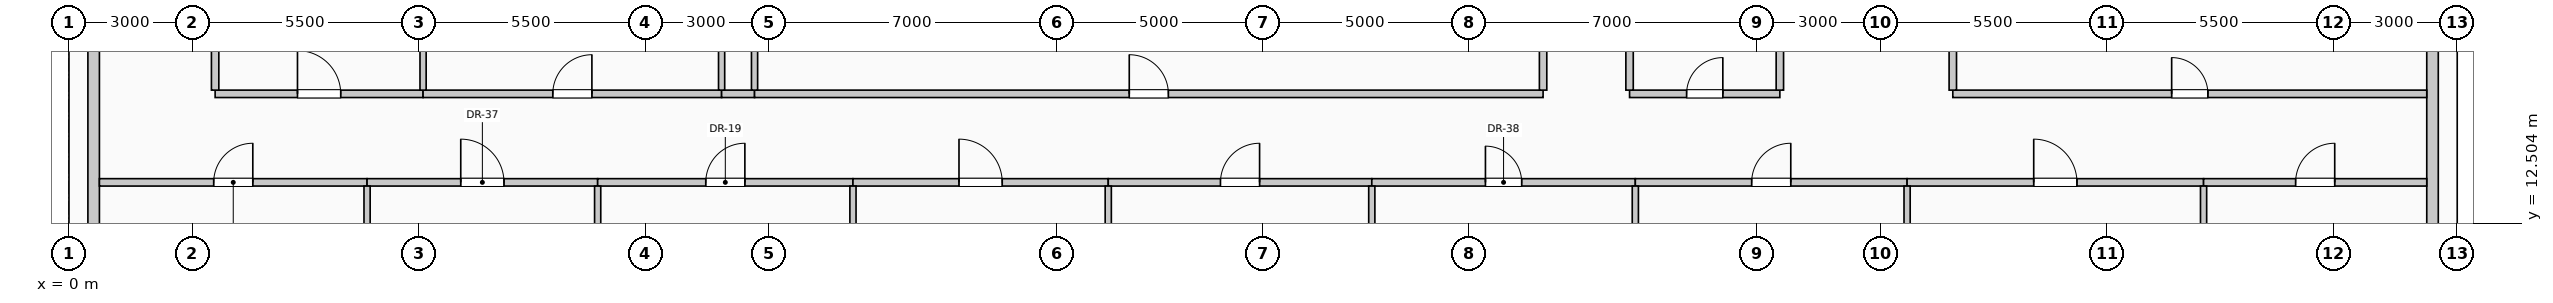
"""IFC4 building model, lengths in metres.
Left out: names, types, materials, properties, quantities, classifications, styles, units other than length and angle.
Written with IfcOpenShell. Run it as: python <this file> out.ifc"""

import sys

from ifc_helpers import new_model, si_unit, direction, frame, frame_2d, origin, place, context, subcontext, project, spatial, rectangle, extrude, element, fill, save


model = new_model("IFC4")
c1 = context("Model", 3, precision=1e-05, world=origin(), true_north=direction((0.0, 1.0)))
c2 = subcontext(c1, "Body", "Model", "MODEL_VIEW")
j1 = project(units=[si_unit("LENGTHUNIT", "METRE"), si_unit("PLANEANGLEUNIT", "RADIAN")], contexts=[c1])
p1 = place(None, origin())
s1 = spatial("IfcSite", under=j1, at=p1, CompositionType="ELEMENT")
p2 = place(p1, origin())
s2 = spatial("IfcBuilding", under=s1, at=p2, CompositionType="ELEMENT")
p3 = place(p2, frame((0.0, 0.0, 152.6)))
s3 = spatial("IfcBuildingStorey", under=s2, at=p3, CompositionType="ELEMENT", Elevation=152.6)
for number, where, z_axis, x_axis in (
    (1, (0.6, 10.445, 0.0), (0.0, 0.0, 1.0), (0.0, 1.0, 0.0)),
    (2, (57.4, 17.555, 0.0), (0.0, 0.0, 1.0), (0.0, -1.0, 0.0)),
):
    element("IfcWall", number, at=place(p3, frame(where, z_axis=z_axis, x_axis=x_axis)), inside=s3, PredefinedType="SOLIDWALL", context=c2, shape_type="SweptSolid", body=[
        extrude(rectangle(XDim=7.11, YDim=0.28, at=frame_2d((3.555, 0.0))), origin(), (0.0, 0.0, 1.0), 2.875),
    ])
p4 = place(p3, frame((0.74, 13.5, 0.0), z_axis=(0.0, 0.0, 1.0), x_axis=(1.0, 0.0, 0.0)))
e3 = element("IfcWall", 3, at=p4, inside=s3, PredefinedType="PARTITIONING", context=c2, shape_type="SweptSolid", body=[
    extrude(rectangle(XDim=6.5, YDim=0.18, at=frame_2d((3.25, 0.0))), origin(), (0.0, 0.0, 1.0), 3.725),
])
p5 = place(p4, frame((2.775, 0.0, 0.0)))
e4 = element("IfcOpeningElement", 4, at=p5, cuts=e3, PredefinedType="OPENING", context=c2, shape_type="SweptSolid", body=[
    extrude(rectangle(XDim=0.95, YDim=2.15, at=frame_2d((0.475, 1.075))), frame((0.0, 0.1, 0.0), z_axis=(0.0, -1.0, 0.0), x_axis=(1.0, 0.0, 0.0)), (0.0, 0.0, 1.0), 0.2),
])
p6 = place(p3, frame((7.24, 13.5, 0.0), z_axis=(0.0, 0.0, 1.0), x_axis=(1.0, 0.0, 0.0)))
e5 = element("IfcWall", 5, at=p6, inside=s3, PredefinedType="PARTITIONING", context=c2, shape_type="SweptSolid", body=[
    extrude(rectangle(XDim=5.6, YDim=0.18, at=frame_2d((2.8, 0.0))), origin(), (0.0, 0.0, 1.0), 3.725),
])
p7 = place(p6, frame((2.275, 0.0, 0.0)))
e6 = element("IfcOpeningElement", 6, at=p7, cuts=e5, PredefinedType="OPENING", context=c2, shape_type="SweptSolid", body=[
    extrude(rectangle(XDim=1.05, YDim=2.15, at=frame_2d((0.525, 1.075))), frame((0.0, 0.1, 0.0), z_axis=(0.0, -1.0, 0.0), x_axis=(1.0, 0.0, 0.0)), (0.0, 0.0, 1.0), 0.2),
])
p8 = place(p3, frame((12.84, 13.5, 0.0), z_axis=(0.0, 0.0, 1.0), x_axis=(1.0, 0.0, 0.0)))
e7 = element("IfcWall", 7, at=p8, inside=s3, PredefinedType="PARTITIONING", context=c2, shape_type="SweptSolid", body=[
    extrude(rectangle(XDim=6.2, YDim=0.18, at=frame_2d((3.1, 0.0))), origin(), (0.0, 0.0, 1.0), 3.725),
])
p9 = place(p8, frame((2.625, 0.0, 0.0)))
e8 = element("IfcOpeningElement", 8, at=p9, cuts=e7, PredefinedType="OPENING", context=c2, shape_type="SweptSolid", body=[
    extrude(rectangle(XDim=0.95, YDim=2.15, at=frame_2d((0.475, 1.075))), frame((0.0, 0.1, 0.0), z_axis=(0.0, -1.0, 0.0), x_axis=(1.0, 0.0, 0.0)), (0.0, 0.0, 1.0), 0.2),
])
p10 = place(p3, frame((19.04, 13.5, 0.0), z_axis=(0.0, 0.0, 1.0), x_axis=(1.0, 0.0, 0.0)))
e9 = element("IfcWall", 9, at=p10, inside=s3, PredefinedType="PARTITIONING", context=c2, shape_type="SweptSolid", body=[
    extrude(rectangle(XDim=6.2, YDim=0.18, at=frame_2d((3.1, 0.0))), origin(), (0.0, 0.0, 1.0), 3.725),
])
p11 = place(p10, frame((2.575, 0.0, 0.0)))
e10 = element("IfcOpeningElement", 10, at=p11, cuts=e9, PredefinedType="OPENING", context=c2, shape_type="SweptSolid", body=[
    extrude(rectangle(XDim=1.05, YDim=2.15, at=frame_2d((0.525, 1.075))), frame((0.0, 0.1, 0.0), z_axis=(0.0, -1.0, 0.0), x_axis=(1.0, 0.0, 0.0)), (0.0, 0.0, 1.0), 0.2),
])
p12 = place(p3, frame((25.24, 13.5, 0.0), z_axis=(0.0, 0.0, 1.0), x_axis=(1.0, 0.0, 0.0)))
e11 = element("IfcWall", 11, at=p12, inside=s3, PredefinedType="PARTITIONING", context=c2, shape_type="SweptSolid", body=[
    extrude(rectangle(XDim=6.4, YDim=0.18, at=frame_2d((3.2, 0.0))), origin(), (0.0, 0.0, 1.0), 3.725),
])
p13 = place(p12, frame((2.725, 0.0, 0.0)))
e12 = element("IfcOpeningElement", 12, at=p13, cuts=e11, PredefinedType="OPENING", context=c2, shape_type="SweptSolid", body=[
    extrude(rectangle(XDim=0.95, YDim=2.15, at=frame_2d((0.475, 1.075))), frame((0.0, 0.1, 0.0), z_axis=(0.0, -1.0, 0.0), x_axis=(1.0, 0.0, 0.0)), (0.0, 0.0, 1.0), 0.2),
])
p14 = place(p3, frame((31.64, 13.5, 0.0), z_axis=(0.0, 0.0, 1.0), x_axis=(1.0, 0.0, 0.0)))
e13 = element("IfcWall", 13, at=p14, inside=s3, PredefinedType="PARTITIONING", context=c2, shape_type="SweptSolid", body=[
    extrude(rectangle(XDim=6.4, YDim=0.18, at=frame_2d((3.2, 0.0))), origin(), (0.0, 0.0, 1.0), 3.725),
])
p15 = place(p14, frame((2.76, 0.0, 0.0)))
e14 = element("IfcOpeningElement", 14, at=p15, cuts=e13, PredefinedType="OPENING", context=c2, shape_type="SweptSolid", body=[
    extrude(rectangle(XDim=0.88, YDim=2.1, at=frame_2d((0.44, 1.05))), frame((0.0, 0.1, 0.0), z_axis=(0.0, -1.0, 0.0), x_axis=(1.0, 0.0, 0.0)), (0.0, 0.0, 1.0), 0.2),
])
p16 = place(p3, frame((38.04, 13.5, 0.0), z_axis=(0.0, 0.0, 1.0), x_axis=(1.0, 0.0, 0.0)))
e15 = element("IfcWall", 15, at=p16, inside=s3, PredefinedType="PARTITIONING", context=c2, shape_type="SweptSolid", body=[
    extrude(rectangle(XDim=6.6, YDim=0.18, at=frame_2d((3.3, 0.0))), origin(), (0.0, 0.0, 1.0), 3.725),
])
p17 = place(p16, frame((2.825, 0.0, 0.0)))
e16 = element("IfcOpeningElement", 16, at=p17, cuts=e15, PredefinedType="OPENING", context=c2, shape_type="SweptSolid", body=[
    extrude(rectangle(XDim=0.95, YDim=2.15, at=frame_2d((0.475, 1.075))), frame((0.0, 0.1, 0.0), z_axis=(0.0, -1.0, 0.0), x_axis=(1.0, 0.0, 0.0)), (0.0, 0.0, 1.0), 0.2),
])
p18 = place(p3, frame((44.64, 13.5, 0.0), z_axis=(0.0, 0.0, 1.0), x_axis=(1.0, 0.0, 0.0)))
e17 = element("IfcWall", 17, at=p18, inside=s3, PredefinedType="PARTITIONING", context=c2, shape_type="SweptSolid", body=[
    extrude(rectangle(XDim=7.2, YDim=0.18, at=frame_2d((3.6, 0.0))), origin(), (0.0, 0.0, 1.0), 3.725),
])
p19 = place(p18, frame((3.075, 0.0, 0.0)))
e18 = element("IfcOpeningElement", 18, at=p19, cuts=e17, PredefinedType="OPENING", context=c2, shape_type="SweptSolid", body=[
    extrude(rectangle(XDim=1.05, YDim=2.15, at=frame_2d((0.525, 1.075))), frame((0.0, 0.1, 0.0), z_axis=(0.0, -1.0, 0.0), x_axis=(1.0, 0.0, 0.0)), (0.0, 0.0, 1.0), 0.2),
])
p20 = place(p3, frame((51.84, 13.5, 0.0), z_axis=(0.0, 0.0, 1.0), x_axis=(1.0, 0.0, 0.0)))
e19 = element("IfcWall", 19, at=p20, inside=s3, PredefinedType="PARTITIONING", context=c2, shape_type="SweptSolid", body=[
    extrude(rectangle(XDim=5.42, YDim=0.18, at=frame_2d((2.71, 0.0))), origin(), (0.0, 0.0, 1.0), 3.725),
])
p21 = place(p20, frame((2.235, 0.0, 0.0)))
e20 = element("IfcOpeningElement", 20, at=p21, cuts=e19, PredefinedType="OPENING", context=c2, shape_type="SweptSolid", body=[
    extrude(rectangle(XDim=0.95, YDim=2.15, at=frame_2d((0.475, 1.075))), frame((0.0, 0.1, 0.0), z_axis=(0.0, -1.0, 0.0), x_axis=(1.0, 0.0, 0.0)), (0.0, 0.0, 1.0), 0.2),
])
p22 = place(p3, frame((3.55, 15.65, 0.0), z_axis=(0.0, 0.0, 1.0), x_axis=(1.0, 0.0, 0.0)))
e21 = element("IfcWall", 21, at=p22, inside=s3, PredefinedType="PARTITIONING", context=c2, shape_type="SweptSolid", body=[
    extrude(rectangle(XDim=5.05, YDim=0.18, at=frame_2d((2.525, 0.0))), origin(), (0.0, 0.0, 1.0), 3.725),
])
p23 = place(p22, frame((2.0, 0.0, 0.0)))
e22 = element("IfcOpeningElement", 22, at=p23, cuts=e21, PredefinedType="OPENING", context=c2, shape_type="SweptSolid", body=[
    extrude(rectangle(XDim=1.05, YDim=2.15, at=frame_2d((0.525, 1.075))), frame((0.0, 0.1, 0.0), z_axis=(0.0, -1.0, 0.0), x_axis=(1.0, 0.0, 0.0)), (0.0, 0.0, 1.0), 0.2),
])
p24 = place(p3, frame((8.6, 15.65, 0.0), z_axis=(0.0, 0.0, 1.0), x_axis=(1.0, 0.0, 0.0)))
e23 = element("IfcWall", 23, at=p24, inside=s3, PredefinedType="PARTITIONING", context=c2, shape_type="SweptSolid", body=[
    extrude(rectangle(XDim=7.25, YDim=0.18, at=frame_2d((3.625, 0.0))), origin(), (0.0, 0.0, 1.0), 3.725),
])
p25 = place(p24, frame((3.15, 0.0, 0.0)))
e24 = element("IfcOpeningElement", 24, at=p25, cuts=e23, PredefinedType="OPENING", context=c2, shape_type="SweptSolid", body=[
    extrude(rectangle(XDim=0.95, YDim=2.15, at=frame_2d((0.475, 1.075))), frame((0.0, 0.1, 0.0), z_axis=(0.0, -1.0, 0.0), x_axis=(1.0, 0.0, 0.0)), (0.0, 0.0, 1.0), 0.2),
])
p26 = place(p3, frame((15.85, 15.65, 0.0), z_axis=(0.0, 0.0, 1.0), x_axis=(1.0, 0.0, 0.0)))
e25 = element("IfcWall", 25, at=p26, inside=s3, PredefinedType="PARTITIONING", context=c2, shape_type="SweptSolid", body=[
    extrude(rectangle(XDim=0.8, YDim=0.18, at=frame_2d((0.4, 0.0))), origin(), (0.0, 0.0, 1.0), 3.725),
])
p27 = place(p3, frame((16.65, 15.65, 0.0), z_axis=(0.0, 0.0, 1.0), x_axis=(1.0, 0.0, 0.0)))
e26 = element("IfcWall", 26, at=p27, inside=s3, PredefinedType="PARTITIONING", context=c2, shape_type="SweptSolid", body=[
    extrude(rectangle(XDim=19.15, YDim=0.18, at=frame_2d((9.575, 0.0))), origin(), (0.0, 0.0, 1.0), 3.725),
])
p28 = place(p27, frame((9.1, 0.0, 0.0)))
e27 = element("IfcOpeningElement", 27, at=p28, cuts=e26, PredefinedType="OPENING", context=c2, shape_type="SweptSolid", body=[
    extrude(rectangle(XDim=0.95, YDim=2.15, at=frame_2d((0.475, 1.075))), frame((0.0, 0.1, 0.0), z_axis=(0.0, -1.0, 0.0), x_axis=(1.0, 0.0, 0.0)), (0.0, 0.0, 1.0), 0.2),
])
p29 = place(p3, frame((37.9, 15.65, 0.0), z_axis=(0.0, 0.0, 1.0), x_axis=(1.0, 0.0, 0.0)))
e28 = element("IfcWall", 28, at=p29, inside=s3, PredefinedType="PARTITIONING", context=c2, shape_type="SweptSolid", body=[
    extrude(rectangle(XDim=3.65, YDim=0.18, at=frame_2d((1.825, 0.0))), origin(), (0.0, 0.0, 1.0), 3.725),
])
p30 = place(p29, frame((1.385, 0.0, 0.0)))
e29 = element("IfcOpeningElement", 29, at=p30, cuts=e28, PredefinedType="OPENING", context=c2, shape_type="SweptSolid", body=[
    extrude(rectangle(XDim=0.88, YDim=2.1, at=frame_2d((0.44, 1.05))), frame((0.0, 0.1, 0.0), z_axis=(0.0, -1.0, 0.0), x_axis=(1.0, 0.0, 0.0)), (0.0, 0.0, 1.0), 0.2),
])
p31 = place(p3, frame((45.75, 15.65, 0.0), z_axis=(0.0, 0.0, 1.0), x_axis=(1.0, 0.0, 0.0)))
e30 = element("IfcWall", 30, at=p31, inside=s3, PredefinedType="PARTITIONING", context=c2, shape_type="SweptSolid", body=[
    extrude(rectangle(XDim=11.51, YDim=0.18, at=frame_2d((5.755, 0.0))), origin(), (0.0, 0.0, 1.0), 3.725),
])
p32 = place(p31, frame((5.315, 0.0, 0.0)))
e31 = element("IfcOpeningElement", 31, at=p32, cuts=e30, PredefinedType="OPENING", context=c2, shape_type="SweptSolid", body=[
    extrude(rectangle(XDim=0.88, YDim=2.1, at=frame_2d((0.44, 1.05))), frame((0.0, 0.1, 0.0), z_axis=(0.0, -1.0, 0.0), x_axis=(1.0, 0.0, 0.0)), (0.0, 0.0, 1.0), 0.2),
])
p33 = place(p3, frame((3.55, 15.74, 0.0), z_axis=(0.0, 0.0, 1.0), x_axis=(0.0, 1.0, 0.0)))
e32 = element("IfcWall", 32, at=p33, inside=s3, PredefinedType="PARTITIONING", context=c2, shape_type="SweptSolid", body=[
    extrude(rectangle(XDim=3.135, YDim=0.18, at=frame_2d((1.567, 0.0))), origin(), (0.0, 0.0, 1.0), 3.725),
])
p34 = place(p3, frame((7.24, 0.74, 0.0), z_axis=(0.0, 0.0, 1.0), x_axis=(0.0, 1.0, 0.0)))
e33 = element("IfcWall", 33, at=p34, inside=s3, PredefinedType="PARTITIONING", context=c2, shape_type="SweptSolid", body=[
    extrude(rectangle(XDim=12.67, YDim=0.15, at=frame_2d((6.335, 0.0))), origin(), (0.0, 0.0, 1.0), 3.725),
])
p35 = place(p3, frame((8.6, 15.74, 0.0), z_axis=(0.0, 0.0, 1.0), x_axis=(0.0, 1.0, 0.0)))
e34 = element("IfcWall", 34, at=p35, inside=s3, PredefinedType="PARTITIONING", context=c2, shape_type="SweptSolid", body=[
    extrude(rectangle(XDim=3.135, YDim=0.15, at=frame_2d((1.567, 0.0))), origin(), (0.0, 0.0, 1.0), 3.725),
])
p36 = place(p3, frame((12.84, 0.74, 0.0), z_axis=(0.0, 0.0, 1.0), x_axis=(0.0, 1.0, 0.0)))
e35 = element("IfcWall", 35, at=p36, inside=s3, PredefinedType="PARTITIONING", context=c2, shape_type="SweptSolid", body=[
    extrude(rectangle(XDim=12.67, YDim=0.15, at=frame_2d((6.335, 0.0))), origin(), (0.0, 0.0, 1.0), 3.725),
])
p37 = place(p3, frame((15.85, 15.74, 0.0), z_axis=(0.0, 0.0, 1.0), x_axis=(0.0, 1.0, 0.0)))
e36 = element("IfcWall", 36, at=p37, inside=s3, PredefinedType="PARTITIONING", context=c2, shape_type="SweptSolid", body=[
    extrude(rectangle(XDim=1.76, YDim=0.15, at=frame_2d((0.88, 0.0))), origin(), (0.0, 0.0, 1.0), 3.725),
])
p38 = place(p3, frame((16.65, 15.74, 0.0), z_axis=(0.0, 0.0, 1.0), x_axis=(0.0, 1.0, 0.0)))
e37 = element("IfcWall", 37, at=p38, inside=s3, PredefinedType="PARTITIONING", context=c2, shape_type="SweptSolid", body=[
    extrude(rectangle(XDim=1.76, YDim=0.15, at=frame_2d((0.88, 0.0))), origin(), (0.0, 0.0, 1.0), 3.07),
])
for number, where, z_axis, x_axis in (
    (38, (19.04, 0.74, 0.0), (0.0, 0.0, 1.0), (0.0, 1.0, 0.0)),
    (39, (25.24, 0.74, 0.0), (0.0, 0.0, 1.0), (0.0, 1.0, 0.0)),
    (40, (31.64, 0.74, 0.0), (0.0, 0.0, 1.0), (0.0, 1.0, 0.0)),
):
    element("IfcWall", number, at=place(p3, frame(where, z_axis=z_axis, x_axis=x_axis)), inside=s3, PredefinedType="PARTITIONING", context=c2, shape_type="SweptSolid", body=[
        extrude(rectangle(XDim=12.67, YDim=0.15, at=frame_2d((6.335, 0.0))), origin(), (0.0, 0.0, 1.0), 3.725),
    ])
p39 = place(p3, frame((35.8, 15.74, 0.0), z_axis=(0.0, 0.0, 1.0), x_axis=(0.0, 1.0, 0.0)))
e41 = element("IfcWall", 41, at=p39, inside=s3, PredefinedType="PARTITIONING", context=c2, shape_type="SweptSolid", body=[
    extrude(rectangle(XDim=9.185, YDim=0.18, at=frame_2d((4.593, 0.0))), origin(), (0.0, 0.0, 1.0), 3.725),
])
p40 = place(p3, frame((37.9, 15.74, 0.0), z_axis=(0.0, 0.0, 1.0), x_axis=(0.0, 1.0, 0.0)))
e42 = element("IfcWall", 42, at=p40, inside=s3, PredefinedType="PARTITIONING", context=c2, shape_type="SweptSolid", body=[
    extrude(rectangle(XDim=11.17, YDim=0.18, at=frame_2d((5.585, 0.0))), origin(), (0.0, 0.0, 1.0), 3.725),
])
p41 = place(p3, frame((38.04, 0.74, 0.0), z_axis=(0.0, 0.0, 1.0), x_axis=(0.0, 1.0, 0.0)))
e43 = element("IfcWall", 43, at=p41, inside=s3, PredefinedType="PARTITIONING", context=c2, shape_type="SweptSolid", body=[
    extrude(rectangle(XDim=12.67, YDim=0.15, at=frame_2d((6.335, 0.0))), origin(), (0.0, 0.0, 1.0), 3.725),
])
p42 = place(p3, frame((41.55, 15.74, 0.0), z_axis=(0.0, 0.0, 1.0), x_axis=(0.0, 1.0, 0.0)))
e44 = element("IfcWall", 44, at=p42, inside=s3, PredefinedType="PARTITIONING", context=c2, shape_type="SweptSolid", body=[
    extrude(rectangle(XDim=1.76, YDim=0.18, at=frame_2d((0.88, 0.0))), origin(), (0.0, 0.0, 1.0), 3.07),
])
p43 = place(p3, frame((44.64, 0.74, 0.0), z_axis=(0.0, 0.0, 1.0), x_axis=(0.0, 1.0, 0.0)))
e45 = element("IfcWall", 45, at=p43, inside=s3, PredefinedType="PARTITIONING", context=c2, shape_type="SweptSolid", body=[
    extrude(rectangle(XDim=12.67, YDim=0.15, at=frame_2d((6.335, 0.0))), origin(), (0.0, 0.0, 1.0), 3.725),
])
p44 = place(p3, frame((45.75, 15.74, 0.0), z_axis=(0.0, 0.0, 1.0), x_axis=(0.0, 1.0, 0.0)))
e46 = element("IfcWall", 46, at=p44, inside=s3, PredefinedType="PARTITIONING", context=c2, shape_type="SweptSolid", body=[
    extrude(rectangle(XDim=7.035, YDim=0.18, at=frame_2d((3.518, 0.0))), origin(), (0.0, 0.0, 1.0), 3.725),
])
p45 = place(p3, frame((51.84, 0.74, 0.0), z_axis=(0.0, 0.0, 1.0), x_axis=(0.0, 1.0, 0.0)))
e47 = element("IfcWall", 47, at=p45, inside=s3, PredefinedType="PARTITIONING", context=c2, shape_type="SweptSolid", body=[
    extrude(rectangle(XDim=12.67, YDim=0.15, at=frame_2d((6.335, 0.0))), origin(), (0.0, 0.0, 1.0), 3.725),
])
p46 = place(p5, origin())
e48 = element("IfcDoor", 48, at=p46, inside=s3, OperationType="SINGLE_SWING_RIGHT", PredefinedType="DOOR", context=c2, shape_type="SweptSolid", body=[
    extrude(rectangle(XDim=0.95, YDim=2.15, at=frame_2d((0.475, 1.075))), frame((0.0, 0.025, 0.0), z_axis=(0.0, -1.0, 0.0), x_axis=(1.0, 0.0, 0.0)), (0.0, 0.0, 1.0), 0.05),
])
fill(e4, e48)
p47 = place(p7, origin())
e49 = element("IfcDoor", 49, at=p47, inside=s3, OperationType="SINGLE_SWING_LEFT", PredefinedType="DOOR", context=c2, shape_type="SweptSolid", body=[
    extrude(rectangle(XDim=1.05, YDim=2.15, at=frame_2d((0.525, 1.075))), frame((0.0, 0.025, 0.0), z_axis=(0.0, -1.0, 0.0), x_axis=(1.0, 0.0, 0.0)), (0.0, 0.0, 1.0), 0.05),
])
fill(e6, e49)
p48 = place(p9, origin())
e50 = element("IfcDoor", 50, at=p48, inside=s3, OperationType="SINGLE_SWING_RIGHT", PredefinedType="DOOR", context=c2, shape_type="SweptSolid", body=[
    extrude(rectangle(XDim=0.95, YDim=2.15, at=frame_2d((0.475, 1.075))), frame((0.0, 0.025, 0.0), z_axis=(0.0, -1.0, 0.0), x_axis=(1.0, 0.0, 0.0)), (0.0, 0.0, 1.0), 0.05),
])
fill(e8, e50)
p49 = place(p11, origin())
e51 = element("IfcDoor", 51, at=p49, inside=s3, OperationType="SINGLE_SWING_LEFT", PredefinedType="DOOR", context=c2, shape_type="SweptSolid", body=[
    extrude(rectangle(XDim=1.05, YDim=2.15, at=frame_2d((0.525, 1.075))), frame((0.0, 0.025, 0.0), z_axis=(0.0, -1.0, 0.0), x_axis=(1.0, 0.0, 0.0)), (0.0, 0.0, 1.0), 0.05),
])
fill(e10, e51)
p50 = place(p13, origin())
e52 = element("IfcDoor", 52, at=p50, inside=s3, OperationType="SINGLE_SWING_RIGHT", PredefinedType="DOOR", context=c2, shape_type="SweptSolid", body=[
    extrude(rectangle(XDim=0.95, YDim=2.15, at=frame_2d((0.475, 1.075))), frame((0.0, 0.025, 0.0), z_axis=(0.0, -1.0, 0.0), x_axis=(1.0, 0.0, 0.0)), (0.0, 0.0, 1.0), 0.05),
])
fill(e12, e52)
p51 = place(p15, origin())
e53 = element("IfcDoor", 53, at=p51, inside=s3, OperationType="SINGLE_SWING_LEFT", PredefinedType="DOOR", context=c2, shape_type="SweptSolid", body=[
    extrude(rectangle(XDim=0.88, YDim=2.1, at=frame_2d((0.44, 1.05))), frame((0.0, 0.025, 0.0), z_axis=(0.0, -1.0, 0.0), x_axis=(1.0, 0.0, 0.0)), (0.0, 0.0, 1.0), 0.05),
])
fill(e14, e53)
p52 = place(p17, origin())
e54 = element("IfcDoor", 54, at=p52, inside=s3, OperationType="SINGLE_SWING_RIGHT", PredefinedType="DOOR", context=c2, shape_type="SweptSolid", body=[
    extrude(rectangle(XDim=0.95, YDim=2.15, at=frame_2d((0.475, 1.075))), frame((0.0, 0.025, 0.0), z_axis=(0.0, -1.0, 0.0), x_axis=(1.0, 0.0, 0.0)), (0.0, 0.0, 1.0), 0.05),
])
fill(e16, e54)
p53 = place(p19, origin())
e55 = element("IfcDoor", 55, at=p53, inside=s3, OperationType="SINGLE_SWING_LEFT", PredefinedType="DOOR", context=c2, shape_type="SweptSolid", body=[
    extrude(rectangle(XDim=1.05, YDim=2.15, at=frame_2d((0.525, 1.075))), frame((0.0, 0.025, 0.0), z_axis=(0.0, -1.0, 0.0), x_axis=(1.0, 0.0, 0.0)), (0.0, 0.0, 1.0), 0.05),
])
fill(e18, e55)
p54 = place(p21, origin())
e56 = element("IfcDoor", 56, at=p54, inside=s3, OperationType="SINGLE_SWING_RIGHT", PredefinedType="DOOR", context=c2, shape_type="SweptSolid", body=[
    extrude(rectangle(XDim=0.95, YDim=2.15, at=frame_2d((0.475, 1.075))), frame((0.0, 0.025, 0.0), z_axis=(0.0, -1.0, 0.0), x_axis=(1.0, 0.0, 0.0)), (0.0, 0.0, 1.0), 0.05),
])
fill(e20, e56)
p55 = place(p23, origin())
e57 = element("IfcDoor", 57, at=p55, inside=s3, OperationType="SINGLE_SWING_LEFT", PredefinedType="DOOR", context=c2, shape_type="SweptSolid", body=[
    extrude(rectangle(XDim=1.05, YDim=2.15, at=frame_2d((0.525, 1.075))), frame((0.0, 0.025, 0.0), z_axis=(0.0, -1.0, 0.0), x_axis=(1.0, 0.0, 0.0)), (0.0, 0.0, 1.0), 0.05),
])
fill(e22, e57)
p56 = place(p25, origin())
e58 = element("IfcDoor", 58, at=p56, inside=s3, OperationType="SINGLE_SWING_RIGHT", PredefinedType="DOOR", context=c2, shape_type="SweptSolid", body=[
    extrude(rectangle(XDim=0.95, YDim=2.15, at=frame_2d((0.475, 1.075))), frame((0.0, 0.025, 0.0), z_axis=(0.0, -1.0, 0.0), x_axis=(1.0, 0.0, 0.0)), (0.0, 0.0, 1.0), 0.05),
])
fill(e24, e58)
p57 = place(p28, origin())
e59 = element("IfcDoor", 59, at=p57, inside=s3, OperationType="SINGLE_SWING_LEFT", PredefinedType="DOOR", context=c2, shape_type="SweptSolid", body=[
    extrude(rectangle(XDim=0.95, YDim=2.15, at=frame_2d((0.475, 1.075))), frame((0.0, 0.025, 0.0), z_axis=(0.0, -1.0, 0.0), x_axis=(1.0, 0.0, 0.0)), (0.0, 0.0, 1.0), 0.05),
])
fill(e27, e59)
p58 = place(p30, origin())
e60 = element("IfcDoor", 60, at=p58, inside=s3, OperationType="SINGLE_SWING_RIGHT", PredefinedType="DOOR", context=c2, shape_type="SweptSolid", body=[
    extrude(rectangle(XDim=0.88, YDim=2.1, at=frame_2d((0.44, 1.05))), frame((0.0, 0.025, 0.0), z_axis=(0.0, -1.0, 0.0), x_axis=(1.0, 0.0, 0.0)), (0.0, 0.0, 1.0), 0.05),
])
fill(e29, e60)
p59 = place(p32, origin())
e61 = element("IfcDoor", 61, at=p59, inside=s3, OperationType="SINGLE_SWING_LEFT", PredefinedType="DOOR", context=c2, shape_type="SweptSolid", body=[
    extrude(rectangle(XDim=0.88, YDim=2.1, at=frame_2d((0.44, 1.05))), frame((0.0, 0.025, 0.0), z_axis=(0.0, -1.0, 0.0), x_axis=(1.0, 0.0, 0.0)), (0.0, 0.0, 1.0), 0.05),
])
fill(e31, e61)
save(model, sys.argv[1])
